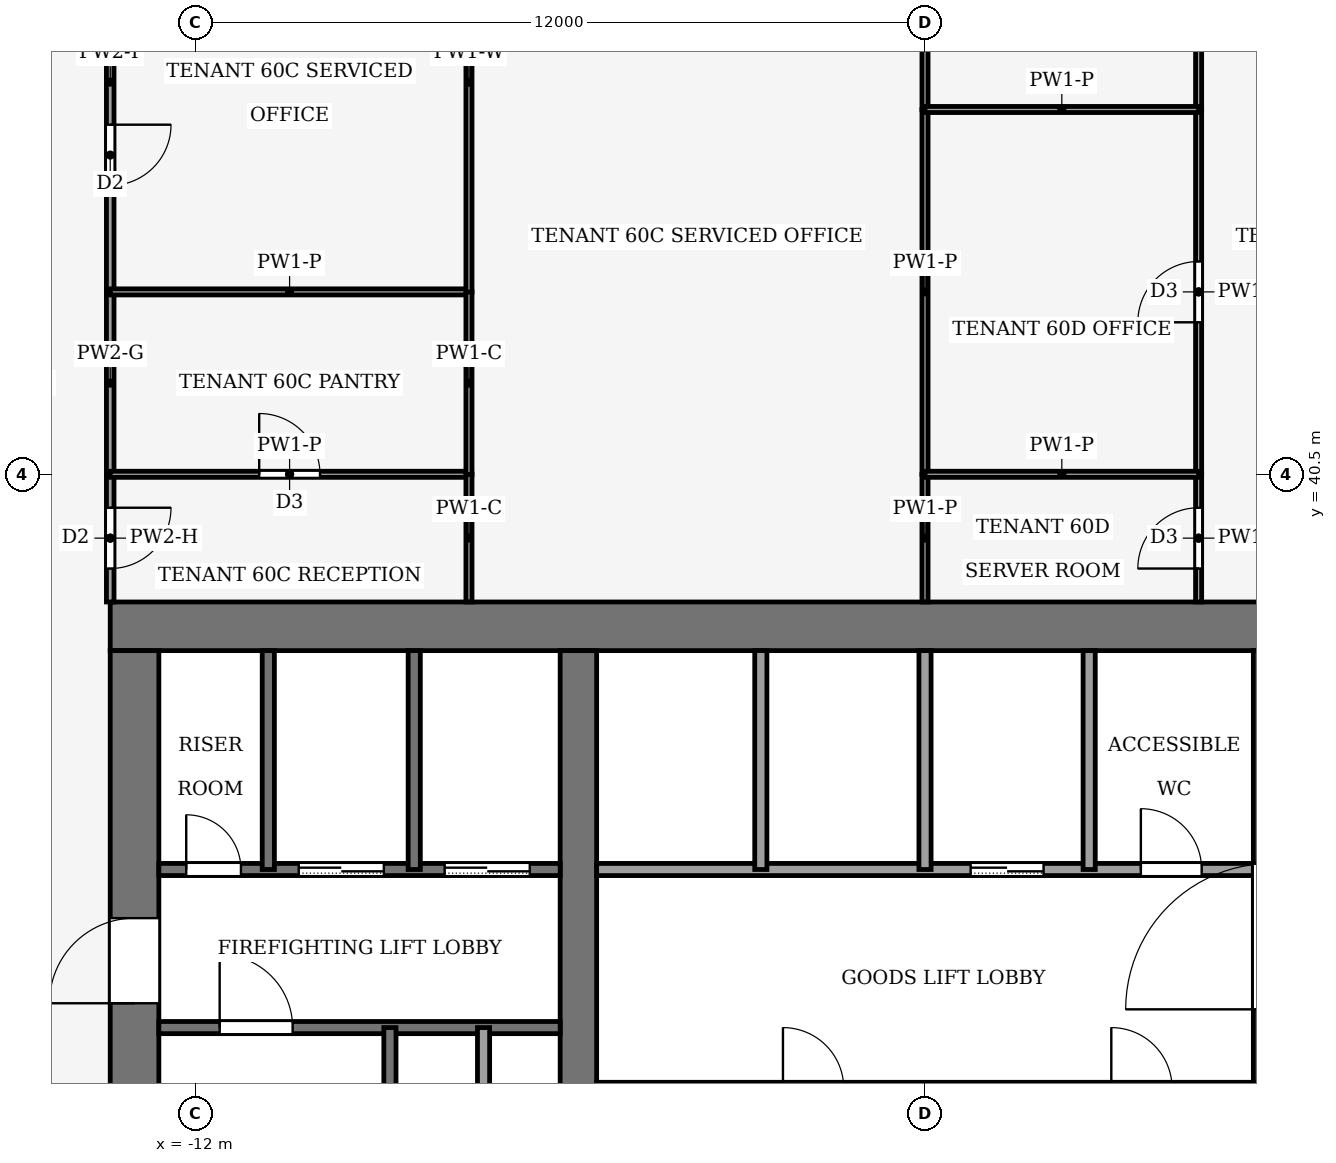
"""IFC4 building model, lengths in metres.
Left out: names, types, materials, properties, quantities, classifications, styles, units other than length and angle.
Written with IfcOpenShell. Run it as: python <this file> out.ifc"""

import sys

from ifc_helpers import new_model, si_unit, direction, frame, frame_2d, origin, place, context, subcontext, project, spatial, rectangle, extrude, element, fill, save


model = new_model("IFC4")
c1 = context("Model", 3, precision=1e-05, world=origin(), true_north=direction((0.0, 1.0)))
c2 = subcontext(c1, "Body", "Model", "MODEL_VIEW")
j1 = project(units=[si_unit("LENGTHUNIT", "METRE"), si_unit("PLANEANGLEUNIT", "RADIAN")], contexts=[c1])
p1 = place(None, origin())
s1 = spatial("IfcSite", under=j1, at=p1, CompositionType="ELEMENT")
p2 = place(p1, origin())
s2 = spatial("IfcBuilding", under=s1, at=p2, CompositionType="ELEMENT")
p3 = place(p2, frame((0.0, 0.0, 262.0)))
s3 = spatial("IfcBuildingStorey", under=s2, at=p3, CompositionType="ELEMENT", Elevation=262.0)
p4 = place(p3, frame((-13.4, 38.0, -0.13), z_axis=(0.0, 0.0, 1.0), x_axis=(1.0, 0.0, 0.0)))
e1 = element("IfcWall", 1, at=p4, inside=s3, PredefinedType="SHEAR", context=c2, shape_type="SweptSolid", body=[
    extrude(rectangle(XDim=26.8, YDim=0.8, at=frame_2d((13.4, 0.0))), origin(), (0.0, 0.0, 1.0), 4.0),
])
p5 = place(p3, frame((-13.0, 18.4, -0.13), z_axis=(0.0, 0.0, 1.0), x_axis=(0.0, 1.0, 0.0)))
e2 = element("IfcWall", 2, at=p5, inside=s3, PredefinedType="SHEAR", context=c2, shape_type="SweptSolid", body=[
    extrude(rectangle(XDim=19.2, YDim=0.8, at=frame_2d((9.6, 0.0))), origin(), (0.0, 0.0, 1.0), 4.0),
])
p6 = place(p5, frame((2.8, 0.0, 0.13)))
e3 = element("IfcOpeningElement", 3, at=p6, cuts=e2, PredefinedType="OPENING", context=c2, shape_type="SweptSolid", body=[
    extrude(rectangle(XDim=2.4, YDim=2.4, at=frame_2d((1.2, 1.2))), frame((0.0, 0.41, 0.0), z_axis=(0.0, -1.0, 0.0), x_axis=(1.0, 0.0, 0.0)), (0.0, 0.0, 1.0), 0.82),
])
p7 = place(p5, frame((13.4, 0.0, 0.13)))
e4 = element("IfcOpeningElement", 4, at=p7, cuts=e2, PredefinedType="OPENING", context=c2, shape_type="SweptSolid", body=[
    extrude(rectangle(XDim=1.4, YDim=2.2, at=frame_2d((0.7, 1.1))), frame((0.0, 0.41, 0.0), z_axis=(0.0, -1.0, 0.0), x_axis=(1.0, 0.0, 0.0)), (0.0, 0.0, 1.0), 0.82),
])
p8 = place(p3, frame((-5.7, 18.4, -0.13), z_axis=(0.0, 0.0, 1.0), x_axis=(0.0, 1.0, 0.0)))
e5 = element("IfcWall", 5, at=p8, inside=s3, PredefinedType="SHEAR", context=c2, shape_type="SweptSolid", body=[
    extrude(rectangle(XDim=19.2, YDim=0.6, at=frame_2d((9.6, 0.0))), origin(), (0.0, 0.0, 1.0), 4.0),
])
p9 = place(p8, frame((8.35, 0.0, 0.13)))
e6 = element("IfcOpeningElement", 6, at=p9, cuts=e5, PredefinedType="OPENING", context=c2, shape_type="SweptSolid", body=[
    extrude(rectangle(XDim=0.9, YDim=2.1, at=frame_2d((0.45, 1.05))), frame((0.0, 0.31, 0.0), z_axis=(0.0, -1.0, 0.0), x_axis=(1.0, 0.0, 0.0)), (0.0, 0.0, 1.0), 0.62),
])
p10 = place(p3, frame((5.7, 18.4, -0.13), z_axis=(0.0, 0.0, 1.0), x_axis=(0.0, 1.0, 0.0)))
e7 = element("IfcWall", 7, at=p10, inside=s3, PredefinedType="SHEAR", context=c2, shape_type="SweptSolid", body=[
    extrude(rectangle(XDim=19.2, YDim=0.6, at=frame_2d((9.6, 0.0))), origin(), (0.0, 0.0, 1.0), 4.0),
])
p11 = place(p10, frame((8.35, 0.0, 0.13)))
e8 = element("IfcOpeningElement", 8, at=p11, cuts=e7, PredefinedType="OPENING", context=c2, shape_type="SweptSolid", body=[
    extrude(rectangle(XDim=0.9, YDim=2.1, at=frame_2d((0.45, 1.05))), frame((0.0, 0.31, 0.0), z_axis=(0.0, -1.0, 0.0), x_axis=(1.0, 0.0, 0.0)), (0.0, 0.0, 1.0), 0.62),
])
p12 = place(p10, frame((13.3, 0.0, 0.13)))
e9 = element("IfcOpeningElement", 9, at=p12, cuts=e7, PredefinedType="OPENING", context=c2, shape_type="SweptSolid", body=[
    extrude(rectangle(XDim=2.4, YDim=2.4, at=frame_2d((1.2, 1.2))), frame((0.0, 0.31, 0.0), z_axis=(0.0, -1.0, 0.0), x_axis=(1.0, 0.0, 0.0)), (0.0, 0.0, 1.0), 0.62),
])
p13 = place(p3, frame((-12.6, 31.4, 0.0), z_axis=(0.0, 0.0, 1.0), x_axis=(1.0, 0.0, 0.0)))
e10 = element("IfcWall", 10, at=p13, inside=s3, PredefinedType="PARTITIONING", context=c2, shape_type="SweptSolid", body=[
    extrude(rectangle(XDim=6.6, YDim=0.2, at=frame_2d((3.3, 0.0))), origin(), (0.0, 0.0, 1.0), 3.87),
])
p14 = place(p13, frame((1.0, 0.0, 0.0)))
e11 = element("IfcOpeningElement", 11, at=p14, cuts=e10, PredefinedType="OPENING", context=c2, shape_type="SweptSolid", body=[
    extrude(rectangle(XDim=1.2, YDim=2.2, at=frame_2d((0.6, 1.1))), frame((0.0, 0.11, 0.0), z_axis=(0.0, -1.0, 0.0), x_axis=(1.0, 0.0, 0.0)), (0.0, 0.0, 1.0), 0.22),
])
p15 = place(p3, frame((-12.6, 34.0, 0.0), z_axis=(0.0, 0.0, 1.0), x_axis=(1.0, 0.0, 0.0)))
e12 = element("IfcWall", 12, at=p15, inside=s3, PredefinedType="PARTITIONING", context=c2, shape_type="SweptSolid", body=[
    extrude(rectangle(XDim=6.6, YDim=0.2, at=frame_2d((3.3, 0.0))), origin(), (0.0, 0.0, 1.0), 3.87),
])
p16 = place(p15, frame((4.7, 0.0, 0.0)))
e13 = element("IfcOpeningElement", 13, at=p16, cuts=e12, PredefinedType="OPENING", context=c2, shape_type="SweptSolid", body=[
    extrude(rectangle(XDim=1.4, YDim=2.2, at=frame_2d((0.7, 1.1))), frame((0.0, 0.11, 0.0), z_axis=(0.0, -1.0, 0.0), x_axis=(1.0, 0.0, 0.0)), (0.0, 0.0, 1.0), 0.22),
])
p17 = place(p15, frame((2.3, 0.0, 0.0)))
e14 = element("IfcOpeningElement", 14, at=p17, cuts=e12, PredefinedType="OPENING", context=c2, shape_type="SweptSolid", body=[
    extrude(rectangle(XDim=1.4, YDim=2.2, at=frame_2d((0.7, 1.1))), frame((0.0, 0.11, 0.0), z_axis=(0.0, -1.0, 0.0), x_axis=(1.0, 0.0, 0.0)), (0.0, 0.0, 1.0), 0.22),
])
p18 = place(p15, frame((0.45, 0.0, 0.0)))
e15 = element("IfcOpeningElement", 15, at=p18, cuts=e12, PredefinedType="OPENING", context=c2, shape_type="SweptSolid", body=[
    extrude(rectangle(XDim=0.9, YDim=2.1, at=frame_2d((0.45, 1.05))), frame((0.0, 0.11, 0.0), z_axis=(0.0, -1.0, 0.0), x_axis=(1.0, 0.0, 0.0)), (0.0, 0.0, 1.0), 0.22),
])
p19 = place(p3, frame((-5.4, 34.0, 0.0), z_axis=(0.0, 0.0, 1.0), x_axis=(1.0, 0.0, 0.0)))
e16 = element("IfcWall", 16, at=p19, inside=s3, PredefinedType="PARTITIONING", context=c2, shape_type="SweptSolid", body=[
    extrude(rectangle(XDim=10.8, YDim=0.2, at=frame_2d((5.4, 0.0))), origin(), (0.0, 0.0, 1.0), 3.87),
])
p20 = place(p19, frame((6.15, 0.0, 0.0)))
e17 = element("IfcOpeningElement", 17, at=p20, cuts=e16, PredefinedType="OPENING", context=c2, shape_type="SweptSolid", body=[
    extrude(rectangle(XDim=1.2, YDim=2.2, at=frame_2d((0.6, 1.1))), frame((0.0, 0.11, 0.0), z_axis=(0.0, -1.0, 0.0), x_axis=(1.0, 0.0, 0.0)), (0.0, 0.0, 1.0), 0.22),
])
p21 = place(p19, frame((8.95, 0.0, 0.0)))
e18 = element("IfcOpeningElement", 18, at=p21, cuts=e16, PredefinedType="OPENING", context=c2, shape_type="SweptSolid", body=[
    extrude(rectangle(XDim=1.0, YDim=2.1, at=frame_2d((0.5, 1.05))), frame((0.0, 0.11, 0.0), z_axis=(0.0, -1.0, 0.0), x_axis=(1.0, 0.0, 0.0)), (0.0, 0.0, 1.0), 0.22),
])
p22 = place(p3, frame((-10.8, 34.0, 0.0), z_axis=(0.0, 0.0, 1.0), x_axis=(0.0, 1.0, 0.0)))
e19 = element("IfcWall", 19, at=p22, inside=s3, PredefinedType="PARTITIONING", context=c2, shape_type="SweptSolid", body=[
    extrude(rectangle(XDim=3.6, YDim=0.2, at=frame_2d((1.8, 0.0))), origin(), (0.0, 0.0, 1.0), 3.87),
])
p23 = place(p3, frame((-8.8, 24.0, 0.0), z_axis=(0.0, 0.0, 1.0), x_axis=(0.0, 1.0, 0.0)))
e20 = element("IfcWall", 20, at=p23, inside=s3, PredefinedType="PARTITIONING", context=c2, shape_type="SweptSolid", body=[
    extrude(rectangle(XDim=7.4, YDim=0.2, at=frame_2d((3.7, 0.0))), origin(), (0.0, 0.0, 1.0), 3.87),
])
p24 = place(p3, frame((-8.4, 34.0, 0.0), z_axis=(0.0, 0.0, 1.0), x_axis=(0.0, 1.0, 0.0)))
e21 = element("IfcWall", 21, at=p24, inside=s3, PredefinedType="PARTITIONING", context=c2, shape_type="SweptSolid", body=[
    extrude(rectangle(XDim=3.6, YDim=0.2, at=frame_2d((1.8, 0.0))), origin(), (0.0, 0.0, 1.0), 3.87),
])
p25 = place(p3, frame((-7.26, 24.0, 0.0), z_axis=(0.0, 0.0, 1.0), x_axis=(0.0, 1.0, 0.0)))
e22 = element("IfcWall", 22, at=p25, inside=s3, PredefinedType="PARTITIONING", context=c2, shape_type="SweptSolid", body=[
    extrude(rectangle(XDim=7.4, YDim=0.2, at=frame_2d((3.7, 0.0))), origin(), (0.0, 0.0, 1.0), 3.87),
])
for number, where, z_axis, x_axis in (
    (23, (-2.7, 34.0, 0.0), (0.0, 0.0, 1.0), (0.0, 1.0, 0.0)),
    (24, (0.0, 34.0, 0.0), (0.0, 0.0, 1.0), (0.0, 1.0, 0.0)),
    (25, (2.7, 34.0, 0.0), (0.0, 0.0, 1.0), (0.0, 1.0, 0.0)),
):
    element("IfcWall", number, at=place(p3, frame(where, z_axis=z_axis, x_axis=x_axis)), inside=s3, PredefinedType="PARTITIONING", context=c2, shape_type="SweptSolid", body=[
        extrude(rectangle(XDim=3.6, YDim=0.2, at=frame_2d((1.8, 0.0))), origin(), (0.0, 0.0, 1.0), 3.87),
    ])
p26 = place(p3, frame((-13.4, 40.5, 0.0), z_axis=(0.0, 0.0, 1.0), x_axis=(0.0, -1.0, 0.0)))
e26 = element("IfcWall", 26, at=p26, inside=s3, PredefinedType="PARTITIONING", context=c2, shape_type="SweptSolid", body=[
    extrude(rectangle(XDim=2.1, YDim=0.125, at=frame_2d((1.05, 0.0))), origin(), (0.0, 0.0, 1.0), 3.14),
])
p27 = place(p26, frame((0.55, 0.0, 0.0)))
e27 = element("IfcOpeningElement", 27, at=p27, cuts=e26, PredefinedType="OPENING", context=c2, shape_type="SweptSolid", body=[
    extrude(rectangle(XDim=1.0, YDim=2.1, at=frame_2d((0.5, 1.05))), frame((0.0, 0.073, 0.0), z_axis=(0.0, -1.0, 0.0), x_axis=(1.0, 0.0, 0.0)), (0.0, 0.0, 1.0), 0.145),
])
p28 = place(p3, frame((-13.4, 40.5, 0.0), z_axis=(0.0, 0.0, 1.0), x_axis=(0.0, 1.0, 0.0)))
e28 = element("IfcWall", 28, at=p28, inside=s3, PredefinedType="PARTITIONING", context=c2, shape_type="SweptSolid", body=[
    extrude(rectangle(XDim=3.0, YDim=0.125, at=frame_2d((1.5, 0.0))), origin(), (0.0, 0.0, 1.0), 3.87),
])
p29 = place(p3, frame((-13.4, 50.4, 0.0), z_axis=(0.0, 0.0, 1.0), x_axis=(0.0, -1.0, 0.0)))
e29 = element("IfcWall", 29, at=p29, inside=s3, PredefinedType="PARTITIONING", context=c2, shape_type="SweptSolid", body=[
    extrude(rectangle(XDim=6.9, YDim=0.125, at=frame_2d((3.45, 0.0))), origin(), (0.0, 0.0, 1.0), 3.24),
])
p30 = place(p29, frame((4.15, 0.0, 0.0)))
e30 = element("IfcOpeningElement", 30, at=p30, cuts=e29, PredefinedType="OPENING", context=c2, shape_type="SweptSolid", body=[
    extrude(rectangle(XDim=1.0, YDim=2.1, at=frame_2d((0.5, 1.05))), frame((0.0, 0.073, 0.0), z_axis=(0.0, -1.0, 0.0), x_axis=(1.0, 0.0, 0.0)), (0.0, 0.0, 1.0), 0.145),
])
p31 = place(p3, frame((-13.4, 40.5, 0.0), z_axis=(0.0, 0.0, 1.0), x_axis=(1.0, 0.0, 0.0)))
e31 = element("IfcWall", 31, at=p31, inside=s3, PredefinedType="PARTITIONING", context=c2, shape_type="SweptSolid", body=[
    extrude(rectangle(XDim=5.9, YDim=0.1, at=frame_2d((2.95, 0.0))), origin(), (0.0, 0.0, 1.0), 3.44),
])
p32 = place(p31, frame((2.45, 0.0, 0.0)))
e32 = element("IfcOpeningElement", 32, at=p32, cuts=e31, PredefinedType="OPENING", context=c2, shape_type="SweptSolid", body=[
    extrude(rectangle(XDim=1.0, YDim=2.1, at=frame_2d((0.5, 1.05))), frame((0.0, 0.06, 0.0), z_axis=(0.0, -1.0, 0.0), x_axis=(1.0, 0.0, 0.0)), (0.0, 0.0, 1.0), 0.12),
])
p33 = place(p3, frame((-7.5, 38.4, 0.0), z_axis=(0.0, 0.0, 1.0), x_axis=(0.0, 1.0, 0.0)))
e33 = element("IfcWall", 33, at=p33, inside=s3, PredefinedType="PARTITIONING", context=c2, shape_type="SweptSolid", body=[
    extrude(rectangle(XDim=2.104, YDim=0.1, at=frame_2d((1.052, 0.0))), origin(), (0.0, 0.0, 1.0), 3.87),
])
p34 = place(p3, frame((-7.5, 43.5, 0.0), z_axis=(0.0, 0.0, 1.0), x_axis=(-1.0, 0.0, 0.0)))
e34 = element("IfcWall", 34, at=p34, inside=s3, PredefinedType="PARTITIONING", context=c2, shape_type="SweptSolid", body=[
    extrude(rectangle(XDim=5.9, YDim=0.1, at=frame_2d((2.95, 0.0))), origin(), (0.0, 0.0, 1.0), 3.44),
])
p35 = place(p3, frame((-7.5, 40.496, 0.0), z_axis=(0.0, 0.0, 1.0), x_axis=(0.0, 1.0, 0.0)))
e35 = element("IfcWall", 35, at=p35, inside=s3, PredefinedType="PARTITIONING", context=c2, shape_type="SweptSolid", body=[
    extrude(rectangle(XDim=3.008, YDim=0.1, at=frame_2d((1.504, 0.0))), origin(), (0.0, 0.0, 1.0), 3.87),
])
p36 = place(p3, frame((-7.5, 43.496, 0.0), z_axis=(0.0, 0.0, 1.0), x_axis=(0.0, 1.0, 0.0)))
e36 = element("IfcWall", 36, at=p36, inside=s3, PredefinedType="PARTITIONING", context=c2, shape_type="SweptSolid", body=[
    extrude(rectangle(XDim=6.904, YDim=0.1, at=frame_2d((3.452, 0.0))), origin(), (0.0, 0.0, 1.0), 3.24),
])
p37 = place(p3, frame((0.0, 38.4, 0.0), z_axis=(0.0, 0.0, 1.0), x_axis=(0.0, 1.0, 0.0)))
e37 = element("IfcWall", 37, at=p37, inside=s3, PredefinedType="PARTITIONING", context=c2, shape_type="SweptSolid", body=[
    extrude(rectangle(XDim=2.1, YDim=0.1, at=frame_2d((1.05, 0.0))), origin(), (0.0, 0.0, 1.0), 3.44),
])
p38 = place(p3, frame((0.0, 40.5, 0.0), z_axis=(0.0, 0.0, 1.0), x_axis=(0.0, 1.0, 0.0)))
e38 = element("IfcWall", 38, at=p38, inside=s3, PredefinedType="PARTITIONING", context=c2, shape_type="SweptSolid", body=[
    extrude(rectangle(XDim=6.0, YDim=0.1, at=frame_2d((3.0, 0.0))), origin(), (0.0, 0.0, 1.0), 3.44),
])
p39 = place(p3, frame((0.0, 46.5, 0.0), z_axis=(0.0, 0.0, 1.0), x_axis=(0.0, 1.0, 0.0)))
e39 = element("IfcWall", 39, at=p39, inside=s3, PredefinedType="PARTITIONING", context=c2, shape_type="SweptSolid", body=[
    extrude(rectangle(XDim=3.9, YDim=0.1, at=frame_2d((1.95, 0.0))), origin(), (0.0, 0.0, 1.0), 3.29),
])
p40 = place(p3, frame((4.5, 38.4, 0.0), z_axis=(0.0, 0.0, 1.0), x_axis=(0.0, 1.0, 0.0)))
e40 = element("IfcWall", 40, at=p40, inside=s3, PredefinedType="PARTITIONING", context=c2, shape_type="SweptSolid", body=[
    extrude(rectangle(XDim=2.1, YDim=0.1, at=frame_2d((1.05, 0.0))), origin(), (0.0, 0.0, 1.0), 3.87),
])
p41 = place(p40, frame((0.55, 0.0, 0.0)))
e41 = element("IfcOpeningElement", 41, at=p41, cuts=e40, PredefinedType="OPENING", context=c2, shape_type="SweptSolid", body=[
    extrude(rectangle(XDim=1.0, YDim=2.1, at=frame_2d((0.5, 1.05))), frame((0.0, 0.06, 0.0), z_axis=(0.0, -1.0, 0.0), x_axis=(1.0, 0.0, 0.0)), (0.0, 0.0, 1.0), 0.12),
])
p42 = place(p3, frame((4.5, 40.5, 0.0), z_axis=(0.0, 0.0, 1.0), x_axis=(0.0, 1.0, 0.0)))
e42 = element("IfcWall", 42, at=p42, inside=s3, PredefinedType="PARTITIONING", context=c2, shape_type="SweptSolid", body=[
    extrude(rectangle(XDim=6.0, YDim=0.1, at=frame_2d((3.0, 0.0))), origin(), (0.0, 0.0, 1.0), 3.87),
])
p43 = place(p42, frame((2.5, 0.0, 0.0)))
e43 = element("IfcOpeningElement", 43, at=p43, cuts=e42, PredefinedType="OPENING", context=c2, shape_type="SweptSolid", body=[
    extrude(rectangle(XDim=1.0, YDim=2.1, at=frame_2d((0.5, 1.05))), frame((0.0, 0.06, 0.0), z_axis=(0.0, -1.0, 0.0), x_axis=(1.0, 0.0, 0.0)), (0.0, 0.0, 1.0), 0.12),
])
p44 = place(p3, frame((4.5, 50.4, 0.0), z_axis=(0.0, 0.0, 1.0), x_axis=(0.0, -1.0, 0.0)))
e44 = element("IfcWall", 44, at=p44, inside=s3, PredefinedType="PARTITIONING", context=c2, shape_type="SweptSolid", body=[
    extrude(rectangle(XDim=3.9, YDim=0.1, at=frame_2d((1.95, 0.0))), origin(), (0.0, 0.0, 1.0), 3.24),
])
for number, where, z_axis, x_axis in (
    (45, (4.5, 40.5, 0.0), (0.0, 0.0, 1.0), (-1.0, 0.0, 0.0)),
    (46, (4.5, 46.5, 0.0), (0.0, 0.0, 1.0), (-1.0, 0.0, 0.0)),
):
    element("IfcWall", number, at=place(p3, frame(where, z_axis=z_axis, x_axis=x_axis)), inside=s3, PredefinedType="PARTITIONING", context=c2, shape_type="SweptSolid", body=[
        extrude(rectangle(XDim=4.5, YDim=0.1, at=frame_2d((2.25, 0.0))), origin(), (0.0, 0.0, 1.0), 3.44),
    ])
p45 = place(p20, origin())
e47 = element("IfcDoor", 47, at=p45, inside=s3, OperationType="SLIDING_TO_LEFT", PredefinedType="DOOR", context=c2, shape_type="SweptSolid", body=[
    extrude(rectangle(XDim=1.2, YDim=2.2, at=frame_2d((0.6, 1.1))), frame((0.0, 0.025, 0.0), z_axis=(0.0, -1.0, 0.0), x_axis=(1.0, 0.0, 0.0)), (0.0, 0.0, 1.0), 0.05),
])
fill(e17, e47)
p46 = place(p16, origin())
e48 = element("IfcDoor", 48, at=p46, inside=s3, OperationType="SLIDING_TO_LEFT", PredefinedType="DOOR", context=c2, shape_type="SweptSolid", body=[
    extrude(rectangle(XDim=1.4, YDim=2.2, at=frame_2d((0.7, 1.1))), frame((0.0, 0.025, 0.0), z_axis=(0.0, -1.0, 0.0), x_axis=(1.0, 0.0, 0.0)), (0.0, 0.0, 1.0), 0.05),
])
fill(e13, e48)
p47 = place(p17, origin())
e49 = element("IfcDoor", 49, at=p47, inside=s3, OperationType="SLIDING_TO_LEFT", PredefinedType="DOOR", context=c2, shape_type="SweptSolid", body=[
    extrude(rectangle(XDim=1.4, YDim=2.2, at=frame_2d((0.7, 1.1))), frame((0.0, 0.025, 0.0), z_axis=(0.0, -1.0, 0.0), x_axis=(1.0, 0.0, 0.0)), (0.0, 0.0, 1.0), 0.05),
])
fill(e14, e49)
p48 = place(p18, origin())
e50 = element("IfcDoor", 50, at=p48, inside=s3, OperationType="SINGLE_SWING_RIGHT", PredefinedType="DOOR", context=c2, shape_type="SweptSolid", body=[
    extrude(rectangle(XDim=0.9, YDim=2.1, at=frame_2d((0.45, 1.05))), frame((0.0, 0.025, 0.0), z_axis=(0.0, -1.0, 0.0), x_axis=(1.0, 0.0, 0.0)), (0.0, 0.0, 1.0), 0.05),
])
fill(e15, e50)
p49 = place(p21, origin())
e51 = element("IfcDoor", 51, at=p49, inside=s3, OperationType="SINGLE_SWING_LEFT", PredefinedType="DOOR", context=c2, shape_type="SweptSolid", body=[
    extrude(rectangle(XDim=1.0, YDim=2.1, at=frame_2d((0.5, 1.05))), frame((0.0, 0.025, 0.0), z_axis=(0.0, -1.0, 0.0), x_axis=(1.0, 0.0, 0.0)), (0.0, 0.0, 1.0), 0.05),
])
fill(e18, e51)
p50 = place(p14, origin())
e52 = element("IfcDoor", 52, at=p50, inside=s3, OperationType="SINGLE_SWING_RIGHT", PredefinedType="DOOR", context=c2, shape_type="SweptSolid", body=[
    extrude(rectangle(XDim=1.2, YDim=2.2, at=frame_2d((0.6, 1.1))), frame((0.0, 0.025, 0.0), z_axis=(0.0, -1.0, 0.0), x_axis=(1.0, 0.0, 0.0)), (0.0, 0.0, 1.0), 0.05),
])
fill(e11, e52)
p51 = place(p7, origin())
e53 = element("IfcDoor", 53, at=p51, inside=s3, OperationType="SINGLE_SWING_RIGHT", PredefinedType="DOOR", context=c2, shape_type="SweptSolid", body=[
    extrude(rectangle(XDim=1.4, YDim=2.2, at=frame_2d((0.7, 1.1))), frame((0.0, 0.025, 0.0), z_axis=(0.0, -1.0, 0.0), x_axis=(1.0, 0.0, 0.0)), (0.0, 0.0, 1.0), 0.05),
])
fill(e4, e53)
p52 = place(p27, origin())
e54 = element("IfcDoor", 54, at=p52, inside=s3, OperationType="SINGLE_SWING_RIGHT", PredefinedType="DOOR", context=c2, shape_type="SweptSolid", body=[
    extrude(rectangle(XDim=1.0, YDim=2.1, at=frame_2d((0.5, 1.05))), frame((0.0, 0.025, 0.0), z_axis=(0.0, -1.0, 0.0), x_axis=(1.0, 0.0, 0.0)), (0.0, 0.0, 1.0), 0.05),
])
fill(e27, e54)
p53 = place(p30, origin())
e55 = element("IfcDoor", 55, at=p53, inside=s3, OperationType="SINGLE_SWING_RIGHT", PredefinedType="DOOR", context=c2, shape_type="SweptSolid", body=[
    extrude(rectangle(XDim=1.0, YDim=2.1, at=frame_2d((0.5, 1.05))), frame((0.0, 0.025, 0.0), z_axis=(0.0, -1.0, 0.0), x_axis=(1.0, 0.0, 0.0)), (0.0, 0.0, 1.0), 0.05),
])
fill(e30, e55)
p54 = place(p32, origin())
e56 = element("IfcDoor", 56, at=p54, inside=s3, OperationType="SINGLE_SWING_LEFT", PredefinedType="DOOR", context=c2, shape_type="SweptSolid", body=[
    extrude(rectangle(XDim=1.0, YDim=2.1, at=frame_2d((0.5, 1.05))), frame((0.0, 0.025, 0.0), z_axis=(0.0, -1.0, 0.0), x_axis=(1.0, 0.0, 0.0)), (0.0, 0.0, 1.0), 0.05),
])
fill(e32, e56)
p55 = place(p41, origin())
e57 = element("IfcDoor", 57, at=p55, inside=s3, OperationType="SINGLE_SWING_RIGHT", PredefinedType="DOOR", context=c2, shape_type="SweptSolid", body=[
    extrude(rectangle(XDim=1.0, YDim=2.1, at=frame_2d((0.5, 1.05))), frame((0.0, 0.025, 0.0), z_axis=(0.0, -1.0, 0.0), x_axis=(1.0, 0.0, 0.0)), (0.0, 0.0, 1.0), 0.05),
])
fill(e41, e57)
p56 = place(p43, origin())
e58 = element("IfcDoor", 58, at=p56, inside=s3, OperationType="SINGLE_SWING_LEFT", PredefinedType="DOOR", context=c2, shape_type="SweptSolid", body=[
    extrude(rectangle(XDim=1.0, YDim=2.1, at=frame_2d((0.5, 1.05))), frame((0.0, 0.025, 0.0), z_axis=(0.0, -1.0, 0.0), x_axis=(1.0, 0.0, 0.0)), (0.0, 0.0, 1.0), 0.05),
])
fill(e43, e58)
save(model, sys.argv[1])
